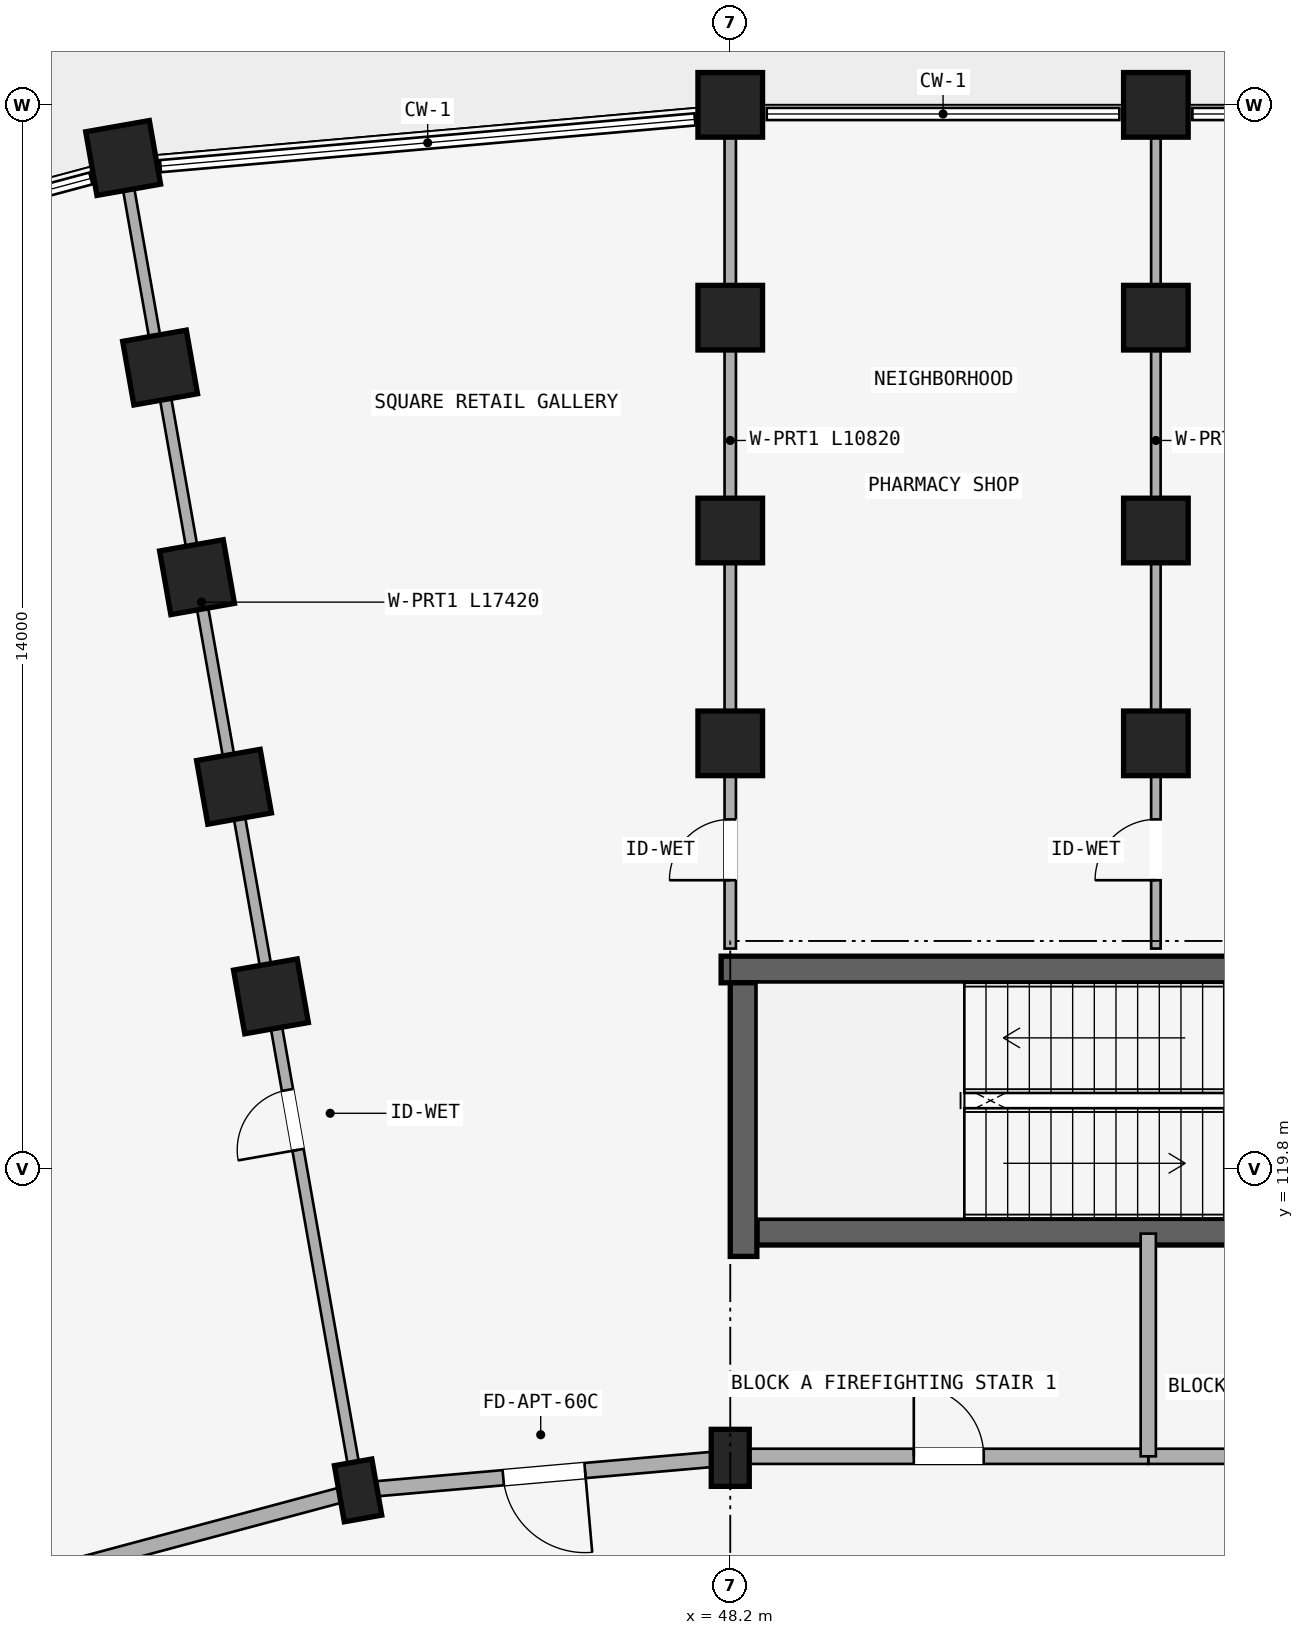
"""IFC4 building model, lengths in metres.
Left out: names, types, materials, properties, quantities, classifications, styles, units other than length and angle.
Written with IfcOpenShell. Run it as: python <this file> out.ifc"""

import sys

from ifc_helpers import new_model, si_unit, direction, frame, frame_2d, origin, origin_2d, place, context, subcontext, project, spatial, rectangle, extrude, element, fill, save


model = new_model("IFC4")
c1 = context("Model", 3, precision=1e-05, world=origin(), true_north=direction((0.0, 1.0)))
c2 = subcontext(c1, "Body", "Model", "MODEL_VIEW")
j1 = project(units=[si_unit("LENGTHUNIT", "METRE"), si_unit("PLANEANGLEUNIT", "RADIAN")], contexts=[c1])
p1 = place(None, origin())
s1 = spatial("IfcSite", under=j1, at=p1, CompositionType="ELEMENT")
p2 = place(p1, origin())
s2 = spatial("IfcBuilding", under=s1, at=p2, CompositionType="ELEMENT")
p3 = place(p2, origin())
s3 = spatial("IfcBuildingStorey", under=s2, at=p3, CompositionType="ELEMENT", Elevation=0.0)
p4 = place(p3, frame((48.08, 122.425, 0.0), z_axis=(0.0, 0.0, 1.0), x_axis=(1.0, 0.0, 0.0)))
e1 = element("IfcWall", 1, at=p4, inside=s3, PredefinedType="SHEAR", context=c2, shape_type="SweptSolid", body=[
    extrude(rectangle(XDim=8.545, YDim=0.35, at=frame_2d((4.272, 0.0))), origin(), (0.0, 0.0, 1.0), 4.15),
])
p5 = place(p3, frame((48.55, 118.975, 0.0), z_axis=(0.0, 0.0, 1.0), x_axis=(1.0, 0.0, 0.0)))
e2 = element("IfcWall", 2, at=p5, inside=s3, PredefinedType="SHEAR", context=c2, shape_type="SweptSolid", body=[
    extrude(rectangle(XDim=8.075, YDim=0.35, at=frame_2d((4.038, 0.0))), origin(), (0.0, 0.0, 1.0), 4.15),
])
p6 = place(p5, frame((6.38, 0.0, 0.0)))
e3 = element("IfcOpeningElement", 3, at=p6, cuts=e2, PredefinedType="OPENING", context=c2, shape_type="SweptSolid", body=[
    extrude(rectangle(XDim=1.24, YDim=2.15, at=frame_2d((0.62, 1.075))), frame((0.0, 0.185, 0.0), z_axis=(0.0, -1.0, 0.0), x_axis=(1.0, 0.0, 0.0)), (0.0, 0.0, 1.0), 0.37),
])
p7 = place(p3, frame((48.375, 118.65, 0.0), z_axis=(0.0, 0.0, 1.0), x_axis=(0.0, 1.0, 0.0)))
e4 = element("IfcWall", 4, at=p7, inside=s3, PredefinedType="SHEAR", context=c2, shape_type="SweptSolid", body=[
    extrude(rectangle(XDim=3.6, YDim=0.35, at=frame_2d((1.8, 0.0))), origin(), (0.0, 0.0, 1.0), 4.15),
])
p8 = place(p3, frame((48.2, 116.0, 0.0), z_axis=(0.0, 0.0, 1.0), x_axis=(1.0, 0.0, 0.0)))
e5 = element("IfcColumn", 5, at=p8, inside=s3, PredefinedType="COLUMN", context=c2, shape_type="SweptSolid", body=[
    extrude(rectangle(XDim=0.5, YDim=0.75, at=origin_2d()), origin(), (0.0, 0.0, 1.0), 4.15),
])
for number, where, z_axis, x_axis in (
    (6, (48.2, 125.4, 0.0), (0.0, 0.0, 1.0), (1.0, 0.0, 0.0)),
    (7, (48.2, 128.2, 0.0), (0.0, 0.0, 1.0), (1.0, 0.0, 0.0)),
    (8, (48.2, 131.0, 0.0), (0.0, 0.0, 1.0), (1.0, 0.0, 0.0)),
    (9, (48.2, 133.8, 0.0), (0.0, 0.0, 1.0), (1.0, 0.0, 0.0)),
):
    element("IfcColumn", number, at=place(p3, frame(where, z_axis=z_axis, x_axis=x_axis)), inside=s3, PredefinedType="COLUMN", context=c2, shape_type="SweptSolid", body=[
        extrude(rectangle(XDim=0.85, YDim=0.85, at=origin_2d()), origin(), (0.0, 0.0, 1.0), 4.15),
    ])
p9 = place(p3, frame((43.303, 115.572, 0.0), z_axis=(0.0, 0.0, 1.0), x_axis=(0.984807753012, 0.173648177667, 0.0)))
e10 = element("IfcColumn", 10, at=p9, inside=s3, PredefinedType="COLUMN", context=c2, shape_type="SweptSolid", body=[
    extrude(rectangle(XDim=0.5, YDim=0.75, at=origin_2d()), origin(), (0.0, 0.0, 1.0), 4.15),
])
for number, where, z_axis, x_axis in (
    (11, (42.157, 122.071, 0.0), (0.0, 0.0, 1.0), (0.985, 0.174, 0.0)),
    (12, (41.671, 124.829, 0.0), (0.0, 0.0, 1.0), (0.985, 0.174, 0.0)),
    (13, (41.185, 127.586, 0.0), (0.0, 0.0, 1.0), (0.985, 0.174, 0.0)),
    (14, (40.698, 130.344, 0.0), (0.0, 0.0, 1.0), (0.985, 0.174, 0.0)),
    (15, (40.212, 133.101, 0.0), (0.0, 0.0, 1.0), (0.985, 0.174, 0.0)),
    (16, (53.8, 125.4, 0.0), (0.0, 0.0, 1.0), (1.0, 0.0, 0.0)),
    (17, (53.8, 128.2, 0.0), (0.0, 0.0, 1.0), (1.0, 0.0, 0.0)),
    (18, (53.8, 131.0, 0.0), (0.0, 0.0, 1.0), (1.0, 0.0, 0.0)),
    (19, (53.8, 133.8, 0.0), (0.0, 0.0, 1.0), (1.0, 0.0, 0.0)),
):
    element("IfcColumn", number, at=place(p3, frame(where, z_axis=z_axis, x_axis=x_axis)), inside=s3, PredefinedType="COLUMN", context=c2, shape_type="SweptSolid", body=[
        extrude(rectangle(XDim=0.85, YDim=0.85, at=origin_2d()), origin(), (0.0, 0.0, 1.0), 4.15),
    ])
p10 = place(p3, frame((53.7, 116.02, 0.0), z_axis=(0.0, 0.0, 1.0), x_axis=(1.0, 0.0, 0.0)))
e20 = element("IfcWall", 20, at=p10, inside=s3, PredefinedType="STANDARD", context=c2, shape_type="SweptSolid", body=[
    extrude(rectangle(XDim=5.65, YDim=0.2, at=frame_2d((2.825, 0.0))), origin(), (0.0, 0.0, 1.0), 3.492),
])
p11 = place(p10, frame((1.923, 0.0, 0.0)))
e21 = element("IfcOpeningElement", 21, at=p11, cuts=e20, PredefinedType="OPENING", context=c2, shape_type="SweptSolid", body=[
    extrude(rectangle(XDim=1.24, YDim=2.15, at=frame_2d((0.62, 1.075))), frame((0.0, 0.11, 0.0), z_axis=(0.0, -1.0, 0.0), x_axis=(1.0, 0.0, 0.0)), (0.0, 0.0, 1.0), 0.22),
])
p12 = place(p3, frame((48.45, 116.02, 0.0), z_axis=(0.0, 0.0, 1.0), x_axis=(1.0, 0.0, 0.0)))
e22 = element("IfcWall", 22, at=p12, inside=s3, PredefinedType="STANDARD", context=c2, shape_type="SweptSolid", body=[
    extrude(rectangle(XDim=5.25, YDim=0.2, at=frame_2d((2.625, 0.0))), origin(), (0.0, 0.0, 1.0), 3.492),
])
p13 = place(p12, frame((2.165, 0.0, 0.0)))
e23 = element("IfcOpeningElement", 23, at=p13, cuts=e22, PredefinedType="OPENING", context=c2, shape_type="SweptSolid", body=[
    extrude(rectangle(XDim=0.92, YDim=2.1, at=frame_2d((0.46, 1.05))), frame((0.0, 0.11, 0.0), z_axis=(0.0, -1.0, 0.0), x_axis=(1.0, 0.0, 0.0)), (0.0, 0.0, 1.0), 0.22),
])
p14 = place(p3, frame((53.7, 116.02, 0.0), z_axis=(0.0, 0.0, 1.0), x_axis=(0.0, 1.0, 0.0)))
e24 = element("IfcWall", 24, at=p14, inside=s3, PredefinedType="STANDARD", context=c2, shape_type="SweptSolid", body=[
    extrude(rectangle(XDim=2.93, YDim=0.2, at=frame_2d((1.465, 0.0))), origin(), (0.0, 0.0, 1.0), 3.492),
])
p15 = place(p3, frame((53.8, 122.7, 0.0), z_axis=(0.0, 0.0, 1.0), x_axis=(0.0, 1.0, 0.0)))
e25 = element("IfcWall", 25, at=p15, inside=s3, PredefinedType="PARTITIONING", context=c2, shape_type="SweptSolid", body=[
    extrude(rectangle(XDim=10.82, YDim=0.125, at=frame_2d((5.41, 0.0))), origin(), (0.0, 0.0, 1.0), 3.492),
])
p16 = place(p15, frame((0.899, 0.0, 0.0)))
e26 = element("IfcOpeningElement", 26, at=p16, cuts=e25, PredefinedType="OPENING", context=c2, shape_type="SweptSolid", body=[
    extrude(rectangle(XDim=0.8, YDim=2.1, at=frame_2d((0.4, 1.05))), frame((0.0, 0.073, 0.0), z_axis=(0.0, -1.0, 0.0), x_axis=(1.0, 0.0, 0.0)), (0.0, 0.0, 1.0), 0.145),
])
p17 = place(p3, frame((48.2, 116.0, 0.0), z_axis=(0.0, 0.0, 1.0), x_axis=(-0.996193663584, -0.087167566415, 0.0)))
e27 = element("IfcWall", 27, at=p17, inside=s3, PredefinedType="STANDARD", context=c2, shape_type="SweptSolid", body=[
    extrude(rectangle(XDim=4.916, YDim=0.2, at=frame_2d((2.458, 0.0))), origin(), (0.0, 0.0, 1.0), 3.492),
])
p18 = place(p17, frame((1.918, 0.0, 0.0)))
e28 = element("IfcOpeningElement", 28, at=p18, cuts=e27, PredefinedType="OPENING", context=c2, shape_type="SweptSolid", body=[
    extrude(rectangle(XDim=1.08, YDim=2.15, at=frame_2d((0.54, 1.075))), frame((0.0, 0.11, 0.0), z_axis=(0.0, -1.0, 0.0), x_axis=(1.0, 0.0, 0.0)), (0.0, 0.0, 1.0), 0.22),
])
p19 = place(p3, frame((43.303, 115.572, 0.0), z_axis=(0.0, 0.0, 1.0), x_axis=(-0.965930095386, -0.258803112091, 0.0)))
e29 = element("IfcWall", 29, at=p19, inside=s3, PredefinedType="STANDARD", context=c2, shape_type="SweptSolid", body=[
    extrude(rectangle(XDim=4.916, YDim=0.2, at=frame_2d((2.458, 0.0))), origin(), (0.0, 0.0, 1.0), 2.942),
])
p20 = place(p3, frame((48.2, 122.7, 0.0), z_axis=(0.0, 0.0, 1.0), x_axis=(0.0, 1.0, 0.0)))
e30 = element("IfcWall", 30, at=p20, inside=s3, PredefinedType="PARTITIONING", context=c2, shape_type="SweptSolid", body=[
    extrude(rectangle(XDim=10.82, YDim=0.15, at=frame_2d((5.41, 0.0))), origin(), (0.0, 0.0, 1.0), 3.492),
])
p21 = place(p20, frame((0.899, 0.0, 0.0)))
e31 = element("IfcOpeningElement", 31, at=p21, cuts=e30, PredefinedType="OPENING", context=c2, shape_type="SweptSolid", body=[
    extrude(rectangle(XDim=0.8, YDim=2.1, at=frame_2d((0.4, 1.05))), frame((0.0, 0.085, 0.0), z_axis=(0.0, -1.0, 0.0), x_axis=(1.0, 0.0, 0.0)), (0.0, 0.0, 1.0), 0.17),
])
p22 = place(p3, frame((43.286, 115.67, 0.0), z_axis=(0.0, 0.0, 1.0), x_axis=(-0.173646216546, 0.984808098809, 0.0)))
e32 = element("IfcWall", 32, at=p22, inside=s3, PredefinedType="PARTITIONING", context=c2, shape_type="SweptSolid", body=[
    extrude(rectangle(XDim=17.42, YDim=0.15, at=frame_2d((8.71, 0.0))), origin(), (0.0, 0.0, 1.0), 2.942),
])
p23 = place(p22, frame((4.45, 0.0, 0.0)))
e33 = element("IfcOpeningElement", 33, at=p23, cuts=e32, PredefinedType="OPENING", context=c2, shape_type="SweptSolid", body=[
    extrude(rectangle(XDim=0.8, YDim=2.1, at=frame_2d((0.4, 1.05))), frame((0.0, 0.085, 0.0), z_axis=(0.0, -1.0, 0.0), x_axis=(1.0, 0.0, 0.0)), (0.0, 0.0, 1.0), 0.17),
])
p24 = place(p13, frame((0.92, 0.0, 0.0), z_axis=(0.0, 0.0, 1.0), x_axis=(-1.0, 0.0, 0.0)))
e34 = element("IfcDoor", 34, at=p24, inside=s3, OperationType="SINGLE_SWING_RIGHT", PredefinedType="DOOR", context=c2, shape_type="SweptSolid", body=[
    extrude(rectangle(XDim=0.92, YDim=2.1, at=frame_2d((0.46, 1.05))), frame((0.0, 0.025, 0.0), z_axis=(0.0, -1.0, 0.0), x_axis=(1.0, 0.0, 0.0)), (0.0, 0.0, 1.0), 0.05),
])
fill(e23, e34)
p25 = place(p16, frame((0.8, 0.0, 0.0), z_axis=(0.0, 0.0, 1.0), x_axis=(-1.0, 0.0, 0.0)))
e35 = element("IfcDoor", 35, at=p25, inside=s3, OperationType="SINGLE_SWING_RIGHT", PredefinedType="DOOR", context=c2, shape_type="SweptSolid", body=[
    extrude(rectangle(XDim=0.8, YDim=2.1, at=frame_2d((0.4, 1.05))), frame((0.0, 0.025, 0.0), z_axis=(0.0, -1.0, 0.0), x_axis=(1.0, 0.0, 0.0)), (0.0, 0.0, 1.0), 0.05),
])
fill(e26, e35)
p26 = place(p21, frame((0.8, 0.0, 0.0), z_axis=(0.0, 0.0, 1.0), x_axis=(-1.0, 0.0, 0.0)))
e36 = element("IfcDoor", 36, at=p26, inside=s3, OperationType="SINGLE_SWING_RIGHT", PredefinedType="DOOR", context=c2, shape_type="SweptSolid", body=[
    extrude(rectangle(XDim=0.8, YDim=2.1, at=frame_2d((0.4, 1.05))), frame((0.0, 0.025, 0.0), z_axis=(0.0, -1.0, 0.0), x_axis=(1.0, 0.0, 0.0)), (0.0, 0.0, 1.0), 0.05),
])
fill(e31, e36)
p27 = place(p23, origin())
e37 = element("IfcDoor", 37, at=p27, inside=s3, OperationType="SINGLE_SWING_LEFT", PredefinedType="DOOR", context=c2, shape_type="SweptSolid", body=[
    extrude(rectangle(XDim=0.8, YDim=2.1, at=frame_2d((0.4, 1.05))), frame((0.0, 0.025, 0.0), z_axis=(0.0, -1.0, 0.0), x_axis=(1.0, 0.0, 0.0)), (0.0, 0.0, 1.0), 0.05),
])
fill(e33, e37)
p28 = place(p18, origin())
e38 = element("IfcDoor", 38, at=p28, inside=s3, OperationType="SINGLE_SWING_LEFT", PredefinedType="DOOR", context=c2, shape_type="SweptSolid", body=[
    extrude(rectangle(XDim=1.08, YDim=2.15, at=frame_2d((0.54, 1.075))), frame((0.0, 0.025, 0.0), z_axis=(0.0, -1.0, 0.0), x_axis=(1.0, 0.0, 0.0)), (0.0, 0.0, 1.0), 0.05),
])
fill(e28, e38)
save(model, sys.argv[1])
